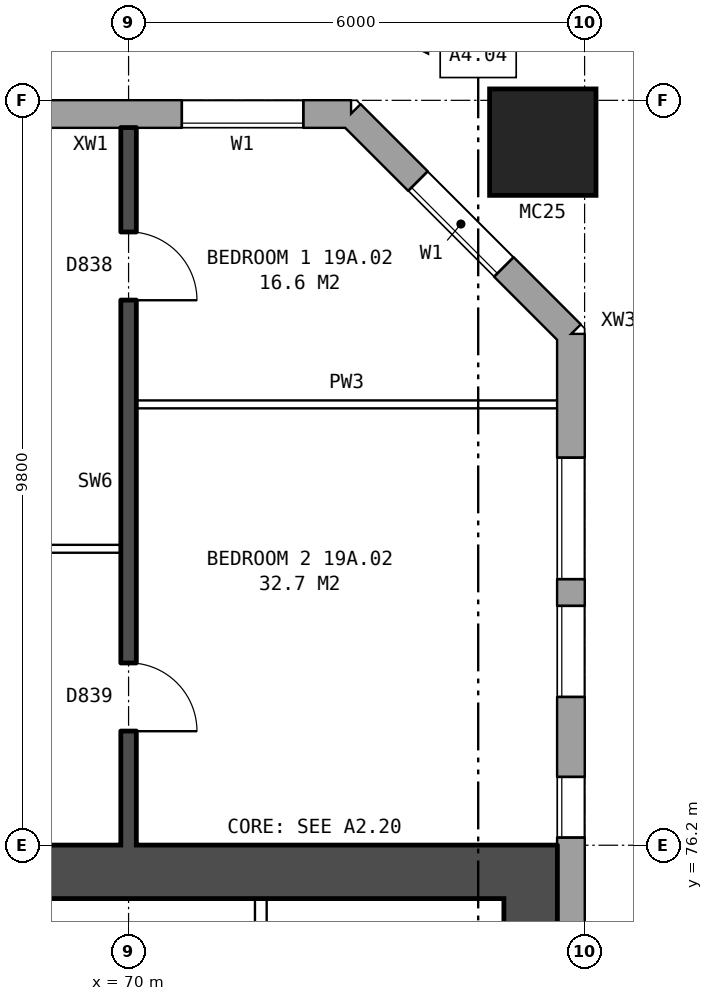
"""IFC4 building model, lengths in metres.
Left out: names, types, materials, properties, quantities, classifications, styles, units other than length and angle.
Written with IfcOpenShell. Run it as: python <this file> out.ifc"""

import sys

from ifc_helpers import new_model, si_unit, direction, frame, frame_2d, origin, origin_2d, place, context, subcontext, project, spatial, rectangle, hollow_rectangle, extrude, element, fill, save


model = new_model("IFC4")
c1 = context("Model", 3, precision=1e-05, world=origin(), true_north=direction((0.0, 1.0)))
c2 = subcontext(c1, "Body", "Model", "MODEL_VIEW")
j1 = project(units=[si_unit("LENGTHUNIT", "METRE"), si_unit("PLANEANGLEUNIT", "RADIAN")], contexts=[c1])
p1 = place(None, origin())
s1 = spatial("IfcSite", under=j1, at=p1, CompositionType="ELEMENT")
p2 = place(p1, origin())
s2 = spatial("IfcBuilding", under=s1, at=p2, CompositionType="ELEMENT")
p3 = place(p2, frame((0.0, 0.0, 71.6)))
s3 = spatial("IfcBuildingStorey", under=s2, at=p3, CompositionType="ELEMENT", Elevation=71.6)
p4 = place(p3, frame((75.45, 85.45, 0.0), z_axis=(0.0, 0.0, 1.0), x_axis=(1.0, 0.0, 0.0)))
e1 = element("IfcColumn", 1, at=p4, inside=s3, PredefinedType="COLUMN", context=c2, shape_type="SweptSolid", body=[
    extrude(hollow_rectangle(XDim=1.4, YDim=1.4, WallThickness=0.075, at=origin_2d()), origin(), (0.0, 0.0, 1.0), 3.1),
])
p5 = place(p3, frame((75.82, 57.075, 0.0), z_axis=(0.0, 0.0, 1.0), x_axis=(0.0, 1.0, 0.0)))
e2 = element("IfcWall", 2, at=p5, inside=s3, PredefinedType="STANDARD", context=c2, shape_type="SweptSolid", body=[
    extrude(rectangle(XDim=25.851, YDim=0.36, at=frame_2d((12.925, 0.0))), origin(), (0.0, 0.0, 1.0), 2.85),
])
p6 = place(p5, frame((1.625, 0.0, 0.8)))
e3 = element("IfcOpeningElement", 3, at=p6, cuts=e2, PredefinedType="OPENING", context=c2, shape_type="SweptSolid", body=[
    extrude(rectangle(XDim=1.6, YDim=1.8, at=frame_2d((0.8, 0.9))), frame((0.0, 0.19, 0.0), z_axis=(0.0, -1.0, 0.0), x_axis=(1.0, 0.0, 0.0)), (0.0, 0.0, 1.0), 0.38),
])
p7 = place(p5, frame((3.525, 0.0, 1.7)))
e4 = element("IfcOpeningElement", 4, at=p7, cuts=e2, PredefinedType="OPENING", context=c2, shape_type="SweptSolid", body=[
    extrude(rectangle(XDim=1.2, YDim=0.9, at=frame_2d((0.6, 0.45))), frame((0.0, 0.19, 0.0), z_axis=(0.0, -1.0, 0.0), x_axis=(1.0, 0.0, 0.0)), (0.0, 0.0, 1.0), 0.38),
])
p8 = place(p5, frame((19.225, 0.0, 0.8)))
e5 = element("IfcOpeningElement", 5, at=p8, cuts=e2, PredefinedType="OPENING", context=c2, shape_type="SweptSolid", body=[
    extrude(rectangle(XDim=0.8, YDim=0.9, at=frame_2d((0.4, 0.45))), frame((0.0, 0.19, 0.0), z_axis=(0.0, -1.0, 0.0), x_axis=(1.0, 0.0, 0.0)), (0.0, 0.0, 1.0), 0.38),
])
p9 = place(p5, frame((22.625, 0.0, 0.8)))
e6 = element("IfcOpeningElement", 6, at=p9, cuts=e2, PredefinedType="OPENING", context=c2, shape_type="SweptSolid", body=[
    extrude(rectangle(XDim=1.6, YDim=1.8, at=frame_2d((0.8, 0.9))), frame((0.0, 0.19, 0.0), z_axis=(0.0, -1.0, 0.0), x_axis=(1.0, 0.0, 0.0)), (0.0, 0.0, 1.0), 0.38),
])
p10 = place(p5, frame((5.775, 0.0, 0.8)))
e7 = element("IfcOpeningElement", 7, at=p10, cuts=e2, PredefinedType="OPENING", context=c2, shape_type="SweptSolid", body=[
    extrude(rectangle(XDim=0.8, YDim=0.9, at=frame_2d((0.4, 0.45))), frame((0.0, 0.19, 0.0), z_axis=(0.0, -1.0, 0.0), x_axis=(1.0, 0.0, 0.0)), (0.0, 0.0, 1.0), 0.38),
])
p11 = place(p5, frame((21.075, 0.0, 1.7)))
e8 = element("IfcOpeningElement", 8, at=p11, cuts=e2, PredefinedType="OPENING", context=c2, shape_type="SweptSolid", body=[
    extrude(rectangle(XDim=1.2, YDim=0.9, at=frame_2d((0.6, 0.45))), frame((0.0, 0.19, 0.0), z_axis=(0.0, -1.0, 0.0), x_axis=(1.0, 0.0, 0.0)), (0.0, 0.0, 1.0), 0.38),
])
p12 = place(p3, frame((75.82, 82.925, 0.0), z_axis=(0.0, 0.0, 1.0), x_axis=(-0.707106781187, 0.707106781187, 0.0)))
e9 = element("IfcWall", 9, at=p12, inside=s3, PredefinedType="STANDARD", context=c2, shape_type="SweptSolid", body=[
    extrude(rectangle(XDim=4.094, YDim=0.36, at=frame_2d((2.047, 0.0))), origin(), (0.0, 0.0, 1.0), 2.85),
])
p13 = place(p12, frame((1.247, 0.0, 0.8)))
e10 = element("IfcOpeningElement", 10, at=p13, cuts=e9, PredefinedType="OPENING", context=c2, shape_type="SweptSolid", body=[
    extrude(rectangle(XDim=1.6, YDim=1.8, at=frame_2d((0.8, 0.9))), frame((0.0, 0.19, 0.0), z_axis=(0.0, -1.0, 0.0), x_axis=(1.0, 0.0, 0.0)), (0.0, 0.0, 1.0), 0.38),
])
p14 = place(p3, frame((72.925, 85.82, 0.0), z_axis=(0.0, 0.0, 1.0), x_axis=(-1.0, 0.0, 0.0)))
e11 = element("IfcWall", 11, at=p14, inside=s3, PredefinedType="STANDARD", context=c2, shape_type="SweptSolid", body=[
    extrude(rectangle(XDim=46.601, YDim=0.36, at=frame_2d((23.3, 0.0))), origin(), (0.0, 0.0, 1.0), 2.85),
])
p15 = place(p14, frame((0.625, 0.0, 0.8)))
e12 = element("IfcOpeningElement", 12, at=p15, cuts=e11, PredefinedType="OPENING", context=c2, shape_type="SweptSolid", body=[
    extrude(rectangle(XDim=1.6, YDim=1.8, at=frame_2d((0.8, 0.9))), frame((0.0, 0.19, 0.0), z_axis=(0.0, -1.0, 0.0), x_axis=(1.0, 0.0, 0.0)), (0.0, 0.0, 1.0), 0.38),
])
p16 = place(p14, frame((4.625, 0.0, 0.8)))
e13 = element("IfcOpeningElement", 13, at=p16, cuts=e11, PredefinedType="OPENING", context=c2, shape_type="SweptSolid", body=[
    extrude(rectangle(XDim=0.8, YDim=0.9, at=frame_2d((0.4, 0.45))), frame((0.0, 0.19, 0.0), z_axis=(0.0, -1.0, 0.0), x_axis=(1.0, 0.0, 0.0)), (0.0, 0.0, 1.0), 0.38),
])
p17 = place(p14, frame((6.625, 0.0, 0.8)))
e14 = element("IfcOpeningElement", 14, at=p17, cuts=e11, PredefinedType="OPENING", context=c2, shape_type="SweptSolid", body=[
    extrude(rectangle(XDim=1.6, YDim=1.8, at=frame_2d((0.8, 0.9))), frame((0.0, 0.19, 0.0), z_axis=(0.0, -1.0, 0.0), x_axis=(1.0, 0.0, 0.0)), (0.0, 0.0, 1.0), 0.38),
])
p18 = place(p14, frame((9.625, 0.0, 0.8)))
e15 = element("IfcOpeningElement", 15, at=p18, cuts=e11, PredefinedType="OPENING", context=c2, shape_type="SweptSolid", body=[
    extrude(rectangle(XDim=1.6, YDim=1.8, at=frame_2d((0.8, 0.9))), frame((0.0, 0.19, 0.0), z_axis=(0.0, -1.0, 0.0), x_axis=(1.0, 0.0, 0.0)), (0.0, 0.0, 1.0), 0.38),
])
p19 = place(p14, frame((12.625, 0.0, 0.8)))
e16 = element("IfcOpeningElement", 16, at=p19, cuts=e11, PredefinedType="OPENING", context=c2, shape_type="SweptSolid", body=[
    extrude(rectangle(XDim=1.6, YDim=1.8, at=frame_2d((0.8, 0.9))), frame((0.0, 0.19, 0.0), z_axis=(0.0, -1.0, 0.0), x_axis=(1.0, 0.0, 0.0)), (0.0, 0.0, 1.0), 0.38),
])
p20 = place(p14, frame((15.625, 0.0, 0.8)))
e17 = element("IfcOpeningElement", 17, at=p20, cuts=e11, PredefinedType="OPENING", context=c2, shape_type="SweptSolid", body=[
    extrude(rectangle(XDim=1.6, YDim=1.8, at=frame_2d((0.8, 0.9))), frame((0.0, 0.19, 0.0), z_axis=(0.0, -1.0, 0.0), x_axis=(1.0, 0.0, 0.0)), (0.0, 0.0, 1.0), 0.38),
])
p21 = place(p14, frame((18.625, 0.0, 0.8)))
e18 = element("IfcOpeningElement", 18, at=p21, cuts=e11, PredefinedType="OPENING", context=c2, shape_type="SweptSolid", body=[
    extrude(rectangle(XDim=1.6, YDim=1.8, at=frame_2d((0.8, 0.9))), frame((0.0, 0.19, 0.0), z_axis=(0.0, -1.0, 0.0), x_axis=(1.0, 0.0, 0.0)), (0.0, 0.0, 1.0), 0.38),
])
p22 = place(p14, frame((21.625, 0.0, 0.8)))
e19 = element("IfcOpeningElement", 19, at=p22, cuts=e11, PredefinedType="OPENING", context=c2, shape_type="SweptSolid", body=[
    extrude(rectangle(XDim=1.6, YDim=1.8, at=frame_2d((0.8, 0.9))), frame((0.0, 0.19, 0.0), z_axis=(0.0, -1.0, 0.0), x_axis=(1.0, 0.0, 0.0)), (0.0, 0.0, 1.0), 0.38),
])
p23 = place(p14, frame((24.625, 0.0, 0.8)))
e20 = element("IfcOpeningElement", 20, at=p23, cuts=e11, PredefinedType="OPENING", context=c2, shape_type="SweptSolid", body=[
    extrude(rectangle(XDim=1.6, YDim=1.8, at=frame_2d((0.8, 0.9))), frame((0.0, 0.19, 0.0), z_axis=(0.0, -1.0, 0.0), x_axis=(1.0, 0.0, 0.0)), (0.0, 0.0, 1.0), 0.38),
])
p24 = place(p14, frame((27.625, 0.0, 0.8)))
e21 = element("IfcOpeningElement", 21, at=p24, cuts=e11, PredefinedType="OPENING", context=c2, shape_type="SweptSolid", body=[
    extrude(rectangle(XDim=1.6, YDim=1.8, at=frame_2d((0.8, 0.9))), frame((0.0, 0.19, 0.0), z_axis=(0.0, -1.0, 0.0), x_axis=(1.0, 0.0, 0.0)), (0.0, 0.0, 1.0), 0.38),
])
p25 = place(p14, frame((30.625, 0.0, 0.8)))
e22 = element("IfcOpeningElement", 22, at=p25, cuts=e11, PredefinedType="OPENING", context=c2, shape_type="SweptSolid", body=[
    extrude(rectangle(XDim=1.6, YDim=1.8, at=frame_2d((0.8, 0.9))), frame((0.0, 0.19, 0.0), z_axis=(0.0, -1.0, 0.0), x_axis=(1.0, 0.0, 0.0)), (0.0, 0.0, 1.0), 0.38),
])
p26 = place(p14, frame((33.625, 0.0, 0.8)))
e23 = element("IfcOpeningElement", 23, at=p26, cuts=e11, PredefinedType="OPENING", context=c2, shape_type="SweptSolid", body=[
    extrude(rectangle(XDim=1.6, YDim=1.8, at=frame_2d((0.8, 0.9))), frame((0.0, 0.19, 0.0), z_axis=(0.0, -1.0, 0.0), x_axis=(1.0, 0.0, 0.0)), (0.0, 0.0, 1.0), 0.38),
])
p27 = place(p14, frame((36.625, 0.0, 0.8)))
e24 = element("IfcOpeningElement", 24, at=p27, cuts=e11, PredefinedType="OPENING", context=c2, shape_type="SweptSolid", body=[
    extrude(rectangle(XDim=1.6, YDim=1.8, at=frame_2d((0.8, 0.9))), frame((0.0, 0.19, 0.0), z_axis=(0.0, -1.0, 0.0), x_axis=(1.0, 0.0, 0.0)), (0.0, 0.0, 1.0), 0.38),
])
p28 = place(p14, frame((39.625, 0.0, 0.8)))
e25 = element("IfcOpeningElement", 25, at=p28, cuts=e11, PredefinedType="OPENING", context=c2, shape_type="SweptSolid", body=[
    extrude(rectangle(XDim=1.6, YDim=1.8, at=frame_2d((0.8, 0.9))), frame((0.0, 0.19, 0.0), z_axis=(0.0, -1.0, 0.0), x_axis=(1.0, 0.0, 0.0)), (0.0, 0.0, 1.0), 0.38),
])
p29 = place(p14, frame((43.225, 0.0, 1.7)))
e26 = element("IfcOpeningElement", 26, at=p29, cuts=e11, PredefinedType="OPENING", context=c2, shape_type="SweptSolid", body=[
    extrude(rectangle(XDim=0.6, YDim=0.9, at=frame_2d((0.3, 0.45))), frame((0.0, 0.19, 0.0), z_axis=(0.0, -1.0, 0.0), x_axis=(1.0, 0.0, 0.0)), (0.0, 0.0, 1.0), 0.38),
])
p30 = place(p14, frame((5.725, 0.0, 0.8)))
e27 = element("IfcOpeningElement", 27, at=p30, cuts=e11, PredefinedType="OPENING", context=c2, shape_type="SweptSolid", body=[
    extrude(rectangle(XDim=0.6, YDim=1.8, at=frame_2d((0.3, 0.9))), frame((0.0, 0.19, 0.0), z_axis=(0.0, -1.0, 0.0), x_axis=(1.0, 0.0, 0.0)), (0.0, 0.0, 1.0), 0.38),
])
p31 = place(p14, frame((44.125, 0.0, 1.0)))
e28 = element("IfcOpeningElement", 28, at=p31, cuts=e11, PredefinedType="OPENING", context=c2, shape_type="SweptSolid", body=[
    extrude(rectangle(XDim=0.6, YDim=1.5, at=frame_2d((0.3, 0.75))), frame((0.0, 0.19, 0.0), z_axis=(0.0, -1.0, 0.0), x_axis=(1.0, 0.0, 0.0)), (0.0, 0.0, 1.0), 0.38),
])
p32 = place(p3, frame((75.29, 64.5, 0.0), z_axis=(0.0, 0.0, 1.0), x_axis=(0.0, 1.0, 0.0)))
e29 = element("IfcWall", 29, at=p32, inside=s3, PredefinedType="SHEAR", context=c2, shape_type="SweptSolid", body=[
    extrude(rectangle(XDim=11.0, YDim=0.7, at=frame_2d((5.5, 0.0))), origin(), (0.0, 0.0, 1.0), 2.85),
])
p33 = place(p3, frame((66.64, 75.85, 0.0), z_axis=(0.0, 0.0, 1.0), x_axis=(1.0, 0.0, 0.0)))
e30 = element("IfcWall", 30, at=p33, inside=s3, PredefinedType="SHEAR", context=c2, shape_type="SweptSolid", body=[
    extrude(rectangle(XDim=9.0, YDim=0.7, at=frame_2d((4.5, 0.0))), origin(), (0.0, 0.0, 1.0), 2.85),
])
p34 = place(p3, frame((71.74, 73.45, 0.0), z_axis=(0.0, 0.0, 1.0), x_axis=(0.0, 1.0, 0.0)))
e31 = element("IfcWall", 31, at=p34, inside=s3, PredefinedType="PARTITIONING", context=c2, shape_type="SweptSolid", body=[
    extrude(rectangle(XDim=2.05, YDim=0.15, at=frame_2d((1.025, 0.0))), origin(), (0.0, 0.0, 1.0), 2.85),
])
p35 = place(p34, frame((0.6, 0.0, 0.0)))
e32 = element("IfcOpeningElement", 32, at=p35, cuts=e31, PredefinedType="OPENING", context=c2, shape_type="SweptSolid", body=[
    extrude(rectangle(XDim=0.85, YDim=2.1, at=frame_2d((0.425, 1.05))), frame((0.0, 0.085, 0.0), z_axis=(0.0, -1.0, 0.0), x_axis=(1.0, 0.0, 0.0)), (0.0, 0.0, 1.0), 0.17),
])
p36 = place(p3, frame((64.1, 80.1, 0.0), z_axis=(0.0, 0.0, 1.0), x_axis=(1.0, 0.0, 0.0)))
e33 = element("IfcWall", 33, at=p36, inside=s3, PredefinedType="PARTITIONING", context=c2, shape_type="SweptSolid", body=[
    extrude(rectangle(XDim=5.8, YDim=0.1, at=frame_2d((2.9, 0.0))), origin(), (0.0, 0.0, 1.0), 2.85),
])
p37 = place(p36, frame((3.6, 0.0, 0.0)))
e34 = element("IfcOpeningElement", 34, at=p37, cuts=e33, PredefinedType="OPENING", context=c2, shape_type="SweptSolid", body=[
    extrude(rectangle(XDim=0.9, YDim=2.1, at=frame_2d((0.45, 1.05))), frame((0.0, 0.06, 0.0), z_axis=(0.0, -1.0, 0.0), x_axis=(1.0, 0.0, 0.0)), (0.0, 0.0, 1.0), 0.12),
])
p38 = place(p36, frame((0.7, 0.0, 0.0)))
e35 = element("IfcOpeningElement", 35, at=p38, cuts=e33, PredefinedType="OPENING", context=c2, shape_type="SweptSolid", body=[
    extrude(rectangle(XDim=0.9, YDim=2.1, at=frame_2d((0.45, 1.05))), frame((0.0, 0.06, 0.0), z_axis=(0.0, -1.0, 0.0), x_axis=(1.0, 0.0, 0.0)), (0.0, 0.0, 1.0), 0.12),
])
p39 = place(p3, frame((70.1, 82.0, 0.0), z_axis=(0.0, 0.0, 1.0), x_axis=(1.0, 0.0, 0.0)))
e36 = element("IfcWall", 36, at=p39, inside=s3, PredefinedType="PARTITIONING", context=c2, shape_type="SweptSolid", body=[
    extrude(rectangle(XDim=5.54, YDim=0.1, at=frame_2d((2.77, 0.0))), origin(), (0.0, 0.0, 1.0), 2.85),
])
p40 = place(p3, frame((70.0, 76.2, 0.0), z_axis=(0.0, 0.0, 1.0), x_axis=(0.0, 1.0, 0.0)))
e37 = element("IfcWall", 37, at=p40, inside=s3, PredefinedType="SOLIDWALL", context=c2, shape_type="SweptSolid", body=[
    extrude(rectangle(XDim=9.44, YDim=0.2, at=frame_2d((4.72, 0.0))), origin(), (0.0, 0.0, 1.0), 2.85),
])
p41 = place(p40, frame((7.17, 0.0, 0.0)))
e38 = element("IfcOpeningElement", 38, at=p41, cuts=e37, PredefinedType="OPENING", context=c2, shape_type="SweptSolid", body=[
    extrude(rectangle(XDim=0.9, YDim=2.1, at=frame_2d((0.45, 1.05))), frame((0.0, 0.11, 0.0), z_axis=(0.0, -1.0, 0.0), x_axis=(1.0, 0.0, 0.0)), (0.0, 0.0, 1.0), 0.22),
])
p42 = place(p40, frame((1.5, 0.0, 0.0)))
e39 = element("IfcOpeningElement", 39, at=p42, cuts=e37, PredefinedType="OPENING", context=c2, shape_type="SweptSolid", body=[
    extrude(rectangle(XDim=0.9, YDim=2.1, at=frame_2d((0.45, 1.05))), frame((0.0, 0.11, 0.0), z_axis=(0.0, -1.0, 0.0), x_axis=(1.0, 0.0, 0.0)), (0.0, 0.0, 1.0), 0.22),
])
p43 = place(p8, origin())
e40 = element("IfcWindow", 40, at=p43, inside=s3, PartitioningType="SINGLE_PANEL", PredefinedType="WINDOW", context=c2, shape_type="SweptSolid", body=[
    extrude(rectangle(XDim=0.8, YDim=0.9, at=frame_2d((0.4, 0.45))), frame((0.0, 0.15, 0.0), z_axis=(0.0, -1.0, 0.0), x_axis=(1.0, 0.0, 0.0)), (0.0, 0.0, 1.0), 0.06),
])
fill(e5, e40)
p44 = place(p9, origin())
e41 = element("IfcWindow", 41, at=p44, inside=s3, PartitioningType="SINGLE_PANEL", PredefinedType="WINDOW", context=c2, shape_type="SweptSolid", body=[
    extrude(rectangle(XDim=1.6, YDim=1.8, at=frame_2d((0.8, 0.9))), frame((0.0, 0.15, 0.0), z_axis=(0.0, -1.0, 0.0), x_axis=(1.0, 0.0, 0.0)), (0.0, 0.0, 1.0), 0.06),
])
fill(e6, e41)
p45 = place(p13, origin())
e42 = element("IfcWindow", 42, at=p45, inside=s3, PartitioningType="SINGLE_PANEL", PredefinedType="WINDOW", context=c2, shape_type="SweptSolid", body=[
    extrude(rectangle(XDim=1.6, YDim=1.8, at=frame_2d((0.8, 0.9))), frame((0.0, 0.15, 0.0), z_axis=(0.0, -1.0, 0.0), x_axis=(1.0, 0.0, 0.0)), (0.0, 0.0, 1.0), 0.06),
])
fill(e10, e42)
p46 = place(p15, origin())
e43 = element("IfcWindow", 43, at=p46, inside=s3, PartitioningType="SINGLE_PANEL", PredefinedType="WINDOW", context=c2, shape_type="SweptSolid", body=[
    extrude(rectangle(XDim=1.6, YDim=1.8, at=frame_2d((0.8, 0.9))), frame((0.0, 0.15, 0.0), z_axis=(0.0, -1.0, 0.0), x_axis=(1.0, 0.0, 0.0)), (0.0, 0.0, 1.0), 0.06),
])
fill(e12, e43)
p47 = place(p41, frame((0.9, 0.0, 0.0), z_axis=(0.0, 0.0, 1.0), x_axis=(-1.0, 0.0, 0.0)))
e44 = element("IfcDoor", 44, at=p47, inside=s3, OperationType="SINGLE_SWING_RIGHT", PredefinedType="DOOR", context=c2, shape_type="SweptSolid", body=[
    extrude(rectangle(XDim=0.9, YDim=2.1, at=frame_2d((0.45, 1.05))), frame((0.0, 0.025, 0.0), z_axis=(0.0, -1.0, 0.0), x_axis=(1.0, 0.0, 0.0)), (0.0, 0.0, 1.0), 0.05),
])
fill(e38, e44)
p48 = place(p42, frame((0.9, 0.0, 0.0), z_axis=(0.0, 0.0, 1.0), x_axis=(-1.0, 0.0, 0.0)))
e45 = element("IfcDoor", 45, at=p48, inside=s3, OperationType="SINGLE_SWING_RIGHT", PredefinedType="DOOR", context=c2, shape_type="SweptSolid", body=[
    extrude(rectangle(XDim=0.9, YDim=2.1, at=frame_2d((0.45, 1.05))), frame((0.0, 0.025, 0.0), z_axis=(0.0, -1.0, 0.0), x_axis=(1.0, 0.0, 0.0)), (0.0, 0.0, 1.0), 0.05),
])
fill(e39, e45)
p49 = place(p11, origin())
e46 = element("IfcWindow", 46, at=p49, inside=s3, PartitioningType="SINGLE_PANEL", PredefinedType="WINDOW", context=c2, shape_type="SweptSolid", body=[
    extrude(rectangle(XDim=1.2, YDim=0.9, at=frame_2d((0.6, 0.45))), frame((0.0, 0.15, 0.0), z_axis=(0.0, -1.0, 0.0), x_axis=(1.0, 0.0, 0.0)), (0.0, 0.0, 1.0), 0.06),
])
fill(e8, e46)
save(model, sys.argv[1])
